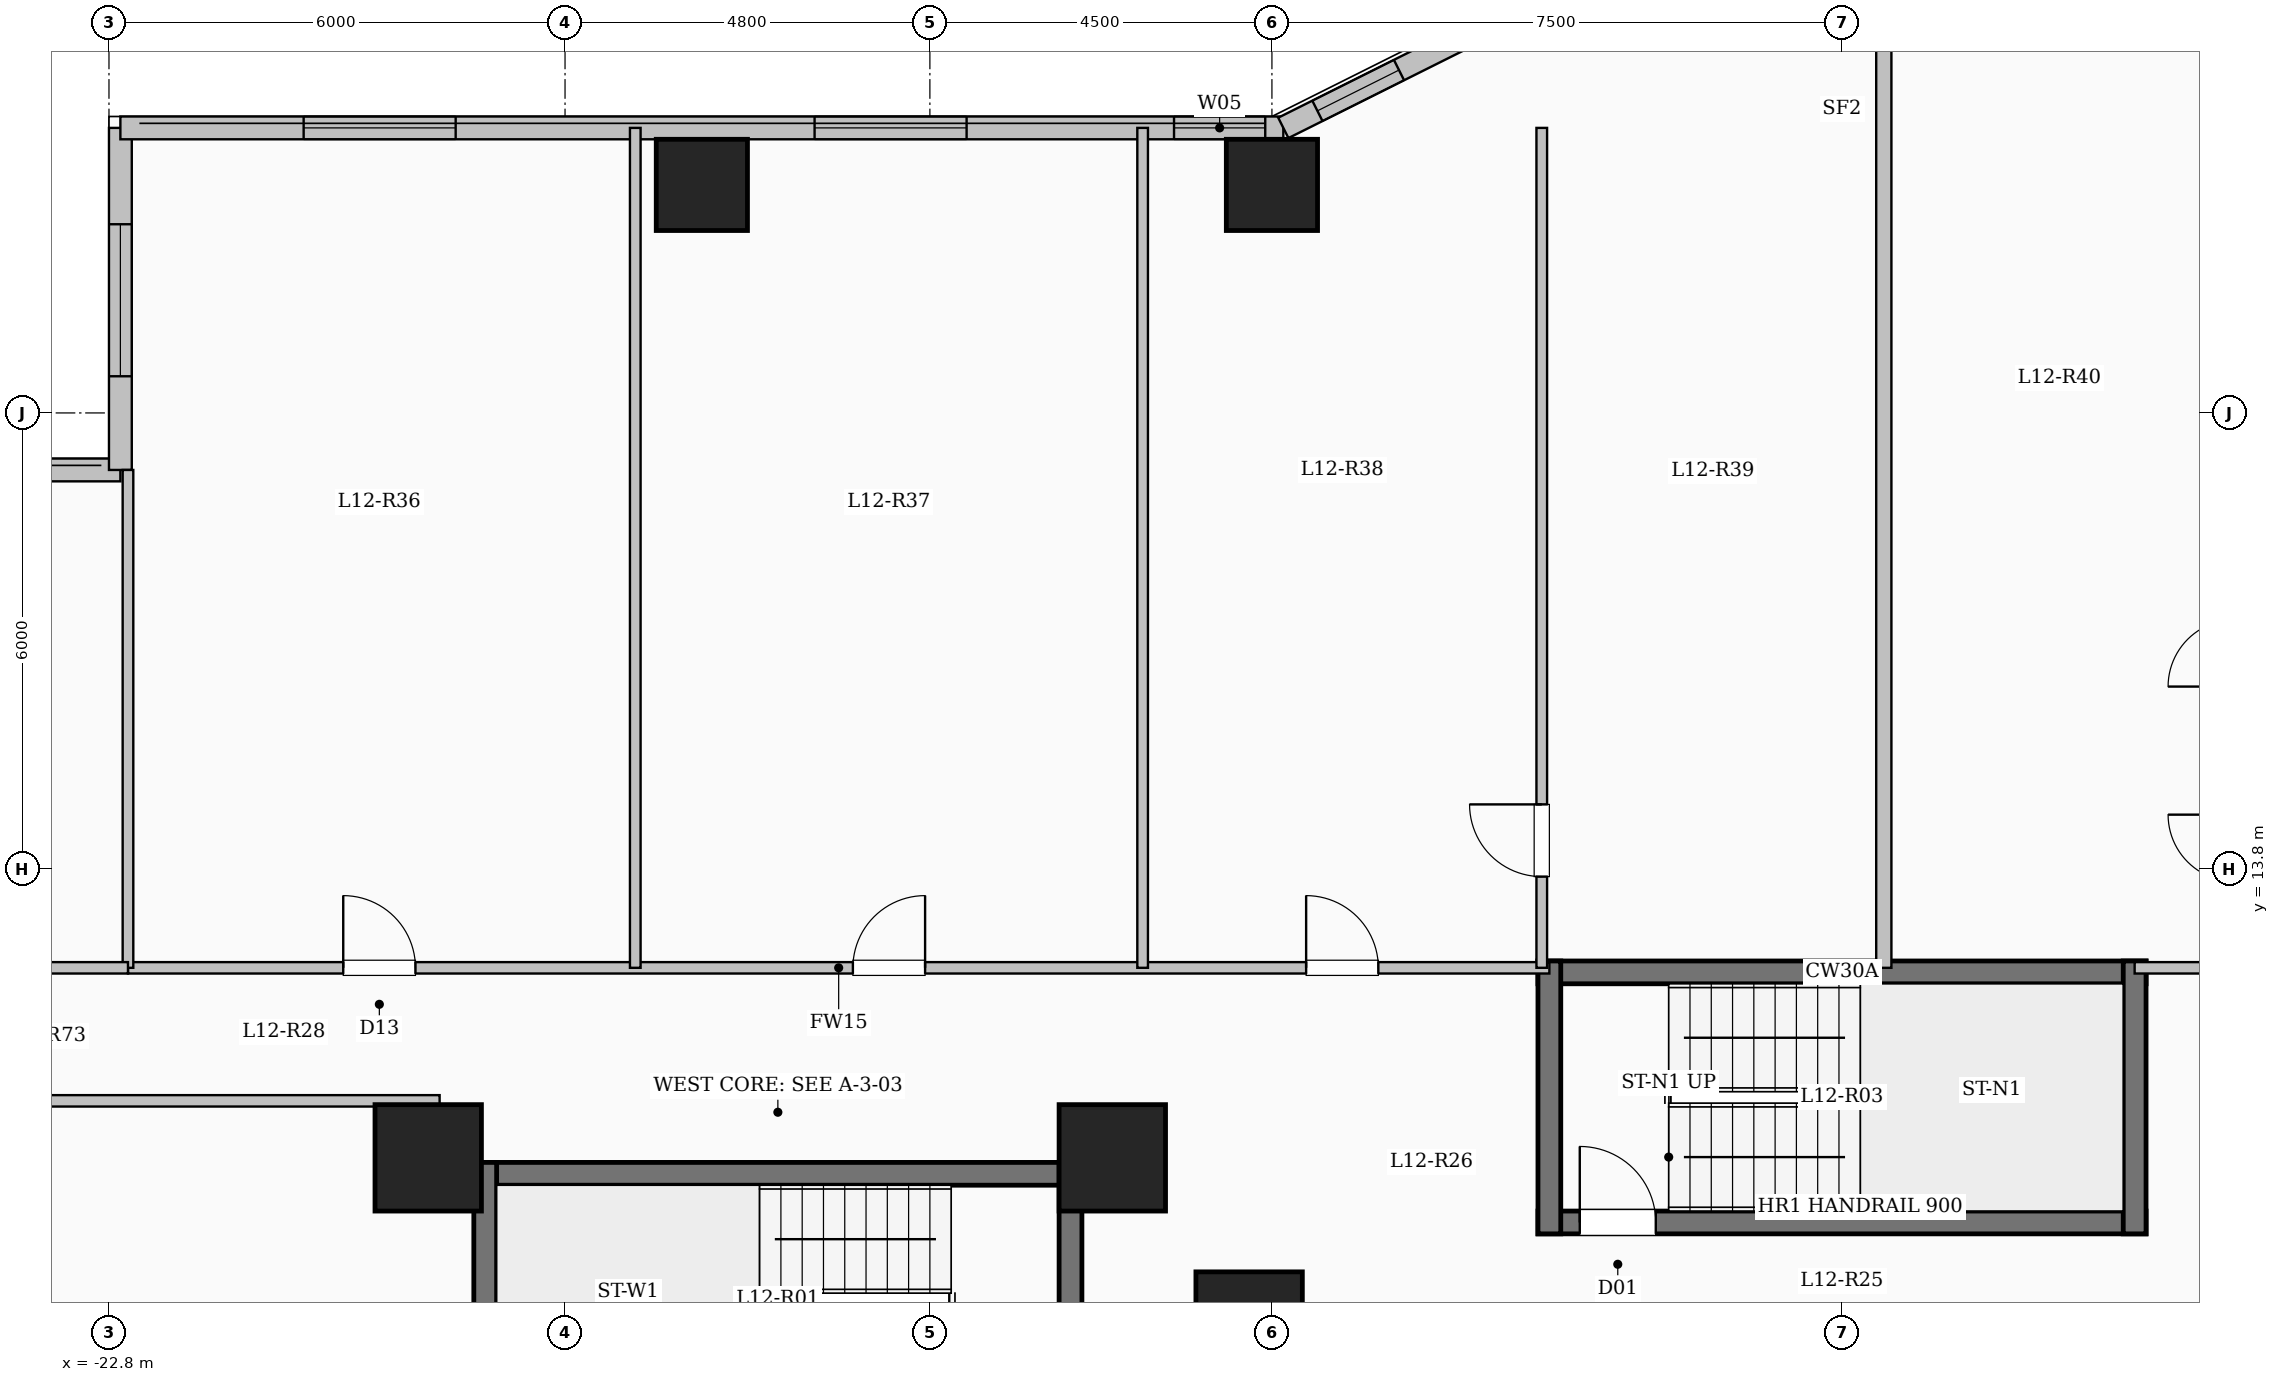
"""IFC4 building model, lengths in metres.
Left out: names, types, materials, properties, quantities, classifications, styles, units other than length and angle.
Written with IfcOpenShell. Run it as: python <this file> out.ifc"""

import sys

from ifc_helpers import new_model, si_unit, direction, frame, frame_2d, origin, origin_2d, place, context, subcontext, project, spatial, rectangle, extrude, element, fill, save


model = new_model("IFC4")
c1 = context("Model", 3, precision=1e-05, world=origin(), true_north=direction((0.0, 1.0)))
c2 = subcontext(c1, "Body", "Model", "MODEL_VIEW")
j1 = project(units=[si_unit("LENGTHUNIT", "METRE"), si_unit("PLANEANGLEUNIT", "RADIAN")], contexts=[c1])
p1 = place(None, origin())
s1 = spatial("IfcSite", under=j1, at=p1, CompositionType="ELEMENT")
p2 = place(p1, origin())
s2 = spatial("IfcBuilding", under=s1, at=p2, CompositionType="ELEMENT")
p3 = place(p2, frame((0.0, 0.0, 47.45)))
s3 = spatial("IfcBuildingStorey", under=s2, at=p3, CompositionType="ELEMENT", Elevation=47.45)
for number, where, z_axis, x_axis in (
    (1, (-7.8, 7.8, 0.0), (0.0, 0.0, 1.0), (1.0, 0.0, 0.0)),
    (2, (-9.6, 10.0, 0.0), (0.0, 0.0, 1.0), (1.0, 0.0, 0.0)),
    (3, (-18.6, 10.0, 0.0), (0.0, 0.0, 1.0), (1.0, 0.0, 0.0)),
):
    element("IfcColumn", number, at=place(p3, frame(where, z_axis=z_axis, x_axis=x_axis)), inside=s3, PredefinedType="COLUMN", context=c2, shape_type="SweptSolid", body=[
        extrude(rectangle(XDim=1.4, YDim=1.4, at=origin_2d()), origin(), (0.0, 0.0, 1.0), 3.35),
    ])
for number, where, z_axis, x_axis in (
    (4, (-15.0, 22.8, 0.0), (0.0, 0.0, 1.0), (1.0, 0.0, 0.0)),
    (5, (-7.5, 22.8, 0.0), (0.0, 0.0, 1.0), (1.0, 0.0, 0.0)),
):
    element("IfcColumn", number, at=place(p3, frame(where, z_axis=z_axis, x_axis=x_axis)), inside=s3, PredefinedType="COLUMN", context=c2, shape_type="SweptSolid", body=[
        extrude(rectangle(XDim=1.2, YDim=1.2, at=origin_2d()), origin(), (0.0, 0.0, 1.0), 3.35),
    ])
p4 = place(p3, frame((-28.65, 19.05, 0.0), z_axis=(0.0, 0.0, 1.0), x_axis=(1.0, 0.0, 0.0)))
e6 = element("IfcWall", 6, at=p4, inside=s3, PredefinedType="SOLIDWALL", context=c2, shape_type="SweptSolid", body=[
    extrude(rectangle(XDim=6.0, YDim=0.3, at=frame_2d((3.0, 0.0))), origin(), (0.0, 0.0, 1.0), 3.1),
])
p5 = place(p4, frame((2.025, 0.0, 0.9)))
e7 = element("IfcOpeningElement", 7, at=p5, cuts=e6, PredefinedType="OPENING", context=c2, shape_type="SweptSolid", body=[
    extrude(rectangle(XDim=2.0, YDim=1.7, at=frame_2d((1.0, 0.85))), frame((0.0, 0.16, 0.0), z_axis=(0.0, -1.0, 0.0), x_axis=(1.0, 0.0, 0.0)), (0.0, 0.0, 1.0), 0.32),
])
p6 = place(p3, frame((-22.65, 19.05, 0.0), z_axis=(0.0, 0.0, 1.0), x_axis=(0.0, 1.0, 0.0)))
e8 = element("IfcWall", 8, at=p6, inside=s3, PredefinedType="SOLIDWALL", context=c2, shape_type="SweptSolid", body=[
    extrude(rectangle(XDim=4.5, YDim=0.3, at=frame_2d((2.25, 0.0))), origin(), (0.0, 0.0, 1.0), 3.1),
])
p7 = place(p6, frame((1.232, 0.0, 0.9)))
e9 = element("IfcOpeningElement", 9, at=p7, cuts=e8, PredefinedType="OPENING", context=c2, shape_type="SweptSolid", body=[
    extrude(rectangle(XDim=2.0, YDim=1.7, at=frame_2d((1.0, 0.85))), frame((0.0, 0.16, 0.0), z_axis=(0.0, -1.0, 0.0), x_axis=(1.0, 0.0, 0.0)), (0.0, 0.0, 1.0), 0.32),
])
p8 = place(p3, frame((-22.65, 23.55, 0.0), z_axis=(0.0, 0.0, 1.0), x_axis=(1.0, 0.0, 0.0)))
e10 = element("IfcWall", 10, at=p8, inside=s3, PredefinedType="SOLIDWALL", context=c2, shape_type="SweptSolid", body=[
    extrude(rectangle(XDim=15.3, YDim=0.3, at=frame_2d((7.65, 0.0))), origin(), (0.0, 0.0, 1.0), 3.1),
])
p9 = place(p8, frame((2.411, 0.0, 0.9)))
e11 = element("IfcOpeningElement", 11, at=p9, cuts=e10, PredefinedType="OPENING", context=c2, shape_type="SweptSolid", body=[
    extrude(rectangle(XDim=2.0, YDim=1.7, at=frame_2d((1.0, 0.85))), frame((0.0, 0.16, 0.0), z_axis=(0.0, -1.0, 0.0), x_axis=(1.0, 0.0, 0.0)), (0.0, 0.0, 1.0), 0.32),
])
p10 = place(p8, frame((9.133, 0.0, 0.9)))
e12 = element("IfcOpeningElement", 12, at=p10, cuts=e10, PredefinedType="OPENING", context=c2, shape_type="SweptSolid", body=[
    extrude(rectangle(XDim=2.0, YDim=1.7, at=frame_2d((1.0, 0.85))), frame((0.0, 0.16, 0.0), z_axis=(0.0, -1.0, 0.0), x_axis=(1.0, 0.0, 0.0)), (0.0, 0.0, 1.0), 0.32),
])
p11 = place(p8, frame((13.862, 0.0, 0.95)))
e13 = element("IfcOpeningElement", 13, at=p11, cuts=e10, PredefinedType="OPENING", context=c2, shape_type="SweptSolid", body=[
    extrude(rectangle(XDim=1.2, YDim=1.5, at=frame_2d((0.6, 0.75))), frame((0.0, 0.16, 0.0), z_axis=(0.0, -1.0, 0.0), x_axis=(1.0, 0.0, 0.0)), (0.0, 0.0, 1.0), 0.32),
])
p12 = place(p3, frame((-7.35, 23.55, 0.0), z_axis=(0.0, 0.0, 1.0), x_axis=(0.894427191, 0.4472135955, 0.0)))
e14 = element("IfcWall", 14, at=p12, inside=s3, PredefinedType="SOLIDWALL", context=c2, shape_type="SweptSolid", body=[
    extrude(rectangle(XDim=3.354, YDim=0.3, at=frame_2d((1.677, 0.0))), origin(), (0.0, 0.0, 1.0), 3.1),
])
p13 = place(p12, frame((0.501, 0.0, 0.95)))
e15 = element("IfcOpeningElement", 15, at=p13, cuts=e14, PredefinedType="OPENING", context=c2, shape_type="SweptSolid", body=[
    extrude(rectangle(XDim=1.2, YDim=1.5, at=frame_2d((0.6, 0.75))), frame((0.0, 0.16, 0.0), z_axis=(0.0, -1.0, 0.0), x_axis=(1.0, 0.0, 0.0)), (0.0, 0.0, 1.0), 0.32),
])
p14 = place(p3, frame((4.35, 25.05, 0.0), z_axis=(0.0, 0.0, 1.0), x_axis=(0.894427191, -0.4472135955, 0.0)))
e16 = element("IfcWall", 16, at=p14, inside=s3, PredefinedType="SOLIDWALL", context=c2, shape_type="SweptSolid", body=[
    extrude(rectangle(XDim=3.354, YDim=0.3, at=frame_2d((1.677, 0.0))), origin(), (0.0, 0.0, 1.0), 3.1),
])
p15 = place(p14, frame((1.778, 0.0, 0.95)))
e17 = element("IfcOpeningElement", 17, at=p15, cuts=e16, PredefinedType="OPENING", context=c2, shape_type="SweptSolid", body=[
    extrude(rectangle(XDim=1.2, YDim=1.5, at=frame_2d((0.6, 0.75))), frame((0.0, 0.16, 0.0), z_axis=(0.0, -1.0, 0.0), x_axis=(1.0, 0.0, 0.0)), (0.0, 0.0, 1.0), 0.32),
])
p16 = place(p3, frame((-18.0, 9.79, 0.0), z_axis=(0.0, 0.0, 1.0), x_axis=(1.0, 0.0, 0.0)))
e18 = element("IfcWall", 18, at=p16, inside=s3, PredefinedType="SHEAR", context=c2, shape_type="SweptSolid", body=[
    extrude(rectangle(XDim=8.0, YDim=0.3, at=frame_2d((4.0, 0.0))), origin(), (0.0, 0.0, 1.0), 3.35),
])
for number, where, z_axis, x_axis in (
    (19, (-17.85, 6.35, 0.0), (0.0, 0.0, 1.0), (0.0, 1.0, 0.0)),
    (20, (-10.15, 6.35, 0.0), (0.0, 0.0, 1.0), (0.0, 1.0, 0.0)),
):
    element("IfcWall", number, at=place(p3, frame(where, z_axis=z_axis, x_axis=x_axis)), inside=s3, PredefinedType="SHEAR", context=c2, shape_type="SweptSolid", body=[
        extrude(rectangle(XDim=3.59, YDim=0.3, at=frame_2d((1.795, 0.0))), origin(), (0.0, 0.0, 1.0), 3.35),
    ])
p17 = place(p3, frame((-4.0, 12.44, 0.0), z_axis=(0.0, 0.0, 1.0), x_axis=(1.0, 0.0, 0.0)))
e21 = element("IfcWall", 21, at=p17, inside=s3, PredefinedType="SHEAR", context=c2, shape_type="SweptSolid", body=[
    extrude(rectangle(XDim=8.0, YDim=0.3, at=frame_2d((4.0, 0.0))), origin(), (0.0, 0.0, 1.0), 3.35),
])
p18 = place(p3, frame((-4.0, 9.15, 0.0), z_axis=(0.0, 0.0, 1.0), x_axis=(1.0, 0.0, 0.0)))
e22 = element("IfcWall", 22, at=p18, inside=s3, PredefinedType="SHEAR", context=c2, shape_type="SweptSolid", body=[
    extrude(rectangle(XDim=8.0, YDim=0.3, at=frame_2d((4.0, 0.0))), origin(), (0.0, 0.0, 1.0), 3.35),
])
p19 = place(p18, frame((0.55, 0.0, 0.0)))
e23 = element("IfcOpeningElement", 23, at=p19, cuts=e22, PredefinedType="OPENING", context=c2, shape_type="SweptSolid", body=[
    extrude(rectangle(XDim=1.0, YDim=2.15, at=frame_2d((0.5, 1.075))), frame((0.0, 0.16, 0.0), z_axis=(0.0, -1.0, 0.0), x_axis=(1.0, 0.0, 0.0)), (0.0, 0.0, 1.0), 0.32),
])
for number, where, z_axis, x_axis in (
    (24, (-3.85, 9.0, 0.0), (0.0, 0.0, 1.0), (0.0, 1.0, 0.0)),
    (25, (3.85, 9.0, 0.0), (0.0, 0.0, 1.0), (0.0, 1.0, 0.0)),
):
    element("IfcWall", number, at=place(p3, frame(where, z_axis=z_axis, x_axis=x_axis)), inside=s3, PredefinedType="SHEAR", context=c2, shape_type="SweptSolid", body=[
        extrude(rectangle(XDim=3.59, YDim=0.3, at=frame_2d((1.795, 0.0))), origin(), (0.0, 0.0, 1.0), 3.35),
    ])
p20 = place(p3, frame((-22.55, 12.5, 0.0), z_axis=(0.0, 0.0, 1.0), x_axis=(1.0, 0.0, 0.0)))
e26 = element("IfcWall", 26, at=p20, inside=s3, PredefinedType="PARTITIONING", context=c2, shape_type="SweptSolid", body=[
    extrude(rectangle(XDim=18.7, YDim=0.15, at=frame_2d((9.35, 0.0))), origin(), (0.0, 0.0, 1.0), 3.1),
])
p21 = place(p20, frame((2.832, 0.0, 0.0)))
e27 = element("IfcOpeningElement", 27, at=p21, cuts=e26, PredefinedType="OPENING", context=c2, shape_type="SweptSolid", body=[
    extrude(rectangle(XDim=0.95, YDim=2.15, at=frame_2d((0.475, 1.075))), frame((0.0, 0.085, 0.0), z_axis=(0.0, -1.0, 0.0), x_axis=(1.0, 0.0, 0.0)), (0.0, 0.0, 1.0), 0.17),
])
p22 = place(p20, frame((9.537, 0.0, 0.0)))
e28 = element("IfcOpeningElement", 28, at=p22, cuts=e26, PredefinedType="OPENING", context=c2, shape_type="SweptSolid", body=[
    extrude(rectangle(XDim=0.95, YDim=2.15, at=frame_2d((0.475, 1.075))), frame((0.0, 0.085, 0.0), z_axis=(0.0, -1.0, 0.0), x_axis=(1.0, 0.0, 0.0)), (0.0, 0.0, 1.0), 0.17),
])
p23 = place(p20, frame((15.5, 0.0, 0.0)))
e29 = element("IfcOpeningElement", 29, at=p23, cuts=e26, PredefinedType="OPENING", context=c2, shape_type="SweptSolid", body=[
    extrude(rectangle(XDim=0.95, YDim=2.15, at=frame_2d((0.475, 1.075))), frame((0.0, 0.085, 0.0), z_axis=(0.0, -1.0, 0.0), x_axis=(1.0, 0.0, 0.0)), (0.0, 0.0, 1.0), 0.17),
])
p24 = place(p3, frame((3.85, 12.5, 0.0), z_axis=(0.0, 0.0, 1.0), x_axis=(1.0, 0.0, 0.0)))
e30 = element("IfcWall", 30, at=p24, inside=s3, PredefinedType="PARTITIONING", context=c2, shape_type="SweptSolid", body=[
    extrude(rectangle(XDim=18.7, YDim=0.15, at=frame_2d((9.35, 0.0))), origin(), (0.0, 0.0, 1.0), 3.1),
])
p25 = place(p24, frame((1.6, 0.0, 0.0)))
e31 = element("IfcOpeningElement", 31, at=p25, cuts=e30, PredefinedType="OPENING", context=c2, shape_type="SweptSolid", body=[
    extrude(rectangle(XDim=0.96, YDim=2.15, at=frame_2d((0.48, 1.075))), frame((0.0, 0.085, 0.0), z_axis=(0.0, -1.0, 0.0), x_axis=(1.0, 0.0, 0.0)), (0.0, 0.0, 1.0), 0.17),
])
p26 = place(p24, frame((6.64, 0.0, 0.0)))
e32 = element("IfcOpeningElement", 32, at=p26, cuts=e30, PredefinedType="OPENING", context=c2, shape_type="SweptSolid", body=[
    extrude(rectangle(XDim=0.96, YDim=2.15, at=frame_2d((0.48, 1.075))), frame((0.0, 0.085, 0.0), z_axis=(0.0, -1.0, 0.0), x_axis=(1.0, 0.0, 0.0)), (0.0, 0.0, 1.0), 0.17),
])
p27 = place(p3, frame((0.55, 12.5, 0.0), z_axis=(0.0, 0.0, 1.0), x_axis=(0.0, 1.0, 0.0)))
e33 = element("IfcWall", 33, at=p27, inside=s3, PredefinedType="SOLIDWALL", context=c2, shape_type="SweptSolid", body=[
    extrude(rectangle(XDim=12.58, YDim=0.2, at=frame_2d((6.29, 0.0))), origin(), (0.0, 0.0, 1.0), 3.1),
])
p28 = place(p3, frame((-3.95, 12.5, 0.0), z_axis=(0.0, 0.0, 1.0), x_axis=(0.0, 1.0, 0.0)))
e34 = element("IfcWall", 34, at=p28, inside=s3, PredefinedType="PARTITIONING", context=c2, shape_type="SweptSolid", body=[
    extrude(rectangle(XDim=11.05, YDim=0.14, at=frame_2d((5.525, 0.0))), origin(), (0.0, 0.0, 1.0), 3.1),
])
p29 = place(p28, frame((1.2, 0.0, 0.0)))
e35 = element("IfcOpeningElement", 35, at=p29, cuts=e34, PredefinedType="OPENING", context=c2, shape_type="SweptSolid", body=[
    extrude(rectangle(XDim=0.95, YDim=2.15, at=frame_2d((0.475, 1.075))), frame((0.0, 0.08, 0.0), z_axis=(0.0, -1.0, 0.0), x_axis=(1.0, 0.0, 0.0)), (0.0, 0.0, 1.0), 0.16),
])
for number, where, z_axis, x_axis in (
    (36, (-15.876, 12.5, 0.0), (0.0, 0.0, 1.0), (0.0, 1.0, 0.0)),
    (37, (-9.201, 12.5, 0.0), (0.0, 0.0, 1.0), (0.0, 1.0, 0.0)),
):
    element("IfcWall", number, at=place(p3, frame(where, z_axis=z_axis, x_axis=x_axis)), inside=s3, PredefinedType="PARTITIONING", context=c2, shape_type="SweptSolid", body=[
        extrude(rectangle(XDim=11.05, YDim=0.14, at=frame_2d((5.525, 0.0))), origin(), (0.0, 0.0, 1.0), 3.1),
    ])
p30 = place(p3, frame((-28.68, 10.75, 0.0), z_axis=(0.0, 0.0, 1.0), x_axis=(1.0, 0.0, 0.0)))
e38 = element("IfcWall", 38, at=p30, inside=s3, PredefinedType="PARTITIONING", context=c2, shape_type="SweptSolid", body=[
    extrude(rectangle(XDim=10.23, YDim=0.15, at=frame_2d((5.115, 0.0))), origin(), (0.0, 0.0, 1.0), 3.1),
])
p31 = place(p3, frame((-22.55, 12.5, 0.0), z_axis=(0.0, 0.0, 1.0), x_axis=(0.0, 1.0, 0.0)))
e39 = element("IfcWall", 39, at=p31, inside=s3, PredefinedType="PARTITIONING", context=c2, shape_type="SweptSolid", body=[
    extrude(rectangle(XDim=6.55, YDim=0.14, at=frame_2d((3.275, 0.0))), origin(), (0.0, 0.0, 1.0), 3.1),
])
p32 = place(p3, frame((-28.68, 12.5, 0.0), z_axis=(0.0, 0.0, 1.0), x_axis=(1.0, 0.0, 0.0)))
e40 = element("IfcWall", 40, at=p32, inside=s3, PredefinedType="PARTITIONING", context=c2, shape_type="SweptSolid", body=[
    extrude(rectangle(XDim=6.13, YDim=0.15, at=frame_2d((3.065, 0.0))), origin(), (0.0, 0.0, 1.0), 3.1),
])
p33 = place(p32, frame((2.59, 0.0, 0.0)))
e41 = element("IfcOpeningElement", 41, at=p33, cuts=e40, PredefinedType="OPENING", context=c2, shape_type="SweptSolid", body=[
    extrude(rectangle(XDim=0.95, YDim=2.15, at=frame_2d((0.475, 1.075))), frame((0.0, 0.085, 0.0), z_axis=(0.0, -1.0, 0.0), x_axis=(1.0, 0.0, 0.0)), (0.0, 0.0, 1.0), 0.17),
])
p34 = place(p7, origin())
e42 = element("IfcWindow", 42, at=p34, inside=s3, PartitioningType="SINGLE_PANEL", PredefinedType="WINDOW", context=c2, shape_type="SweptSolid", body=[
    extrude(rectangle(XDim=2.0, YDim=1.7, at=frame_2d((1.0, 0.85))), frame((0.0, 0.03, 0.0), z_axis=(0.0, -1.0, 0.0), x_axis=(1.0, 0.0, 0.0)), (0.0, 0.0, 1.0), 0.06),
])
fill(e9, e42)
p35 = place(p9, origin())
e43 = element("IfcWindow", 43, at=p35, inside=s3, PartitioningType="SINGLE_PANEL", PredefinedType="WINDOW", context=c2, shape_type="SweptSolid", body=[
    extrude(rectangle(XDim=2.0, YDim=1.7, at=frame_2d((1.0, 0.85))), frame((0.0, 0.03, 0.0), z_axis=(0.0, -1.0, 0.0), x_axis=(1.0, 0.0, 0.0)), (0.0, 0.0, 1.0), 0.06),
])
fill(e11, e43)
p36 = place(p10, origin())
e44 = element("IfcWindow", 44, at=p36, inside=s3, PartitioningType="SINGLE_PANEL", PredefinedType="WINDOW", context=c2, shape_type="SweptSolid", body=[
    extrude(rectangle(XDim=2.0, YDim=1.7, at=frame_2d((1.0, 0.85))), frame((0.0, 0.03, 0.0), z_axis=(0.0, -1.0, 0.0), x_axis=(1.0, 0.0, 0.0)), (0.0, 0.0, 1.0), 0.06),
])
fill(e12, e44)
p37 = place(p11, origin())
e45 = element("IfcWindow", 45, at=p37, inside=s3, PartitioningType="SINGLE_PANEL", PredefinedType="WINDOW", context=c2, shape_type="SweptSolid", body=[
    extrude(rectangle(XDim=1.2, YDim=1.5, at=frame_2d((0.6, 0.75))), frame((0.0, 0.03, 0.0), z_axis=(0.0, -1.0, 0.0), x_axis=(1.0, 0.0, 0.0)), (0.0, 0.0, 1.0), 0.06),
])
fill(e13, e45)
p38 = place(p13, origin())
e46 = element("IfcWindow", 46, at=p38, inside=s3, PartitioningType="SINGLE_PANEL", PredefinedType="WINDOW", context=c2, shape_type="SweptSolid", body=[
    extrude(rectangle(XDim=1.2, YDim=1.5, at=frame_2d((0.6, 0.75))), frame((0.0, 0.03, 0.0), z_axis=(0.0, -1.0, 0.0), x_axis=(1.0, 0.0, 0.0)), (0.0, 0.0, 1.0), 0.06),
])
fill(e15, e46)
p39 = place(p19, origin())
e47 = element("IfcDoor", 47, at=p39, inside=s3, OperationType="SINGLE_SWING_LEFT", PredefinedType="DOOR", context=c2, shape_type="SweptSolid", body=[
    extrude(rectangle(XDim=1.0, YDim=2.15, at=frame_2d((0.5, 1.075))), frame((0.0, 0.025, 0.0), z_axis=(0.0, -1.0, 0.0), x_axis=(1.0, 0.0, 0.0)), (0.0, 0.0, 1.0), 0.05),
])
fill(e23, e47)
p40 = place(p21, origin())
e48 = element("IfcDoor", 48, at=p40, inside=s3, OperationType="SINGLE_SWING_LEFT", PredefinedType="DOOR", context=c2, shape_type="SweptSolid", body=[
    extrude(rectangle(XDim=0.95, YDim=2.15, at=frame_2d((0.475, 1.075))), frame((0.0, 0.025, 0.0), z_axis=(0.0, -1.0, 0.0), x_axis=(1.0, 0.0, 0.0)), (0.0, 0.0, 1.0), 0.05),
])
fill(e27, e48)
p41 = place(p22, origin())
e49 = element("IfcDoor", 49, at=p41, inside=s3, OperationType="SINGLE_SWING_RIGHT", PredefinedType="DOOR", context=c2, shape_type="SweptSolid", body=[
    extrude(rectangle(XDim=0.95, YDim=2.15, at=frame_2d((0.475, 1.075))), frame((0.0, 0.025, 0.0), z_axis=(0.0, -1.0, 0.0), x_axis=(1.0, 0.0, 0.0)), (0.0, 0.0, 1.0), 0.05),
])
fill(e28, e49)
p42 = place(p23, origin())
e50 = element("IfcDoor", 50, at=p42, inside=s3, OperationType="SINGLE_SWING_LEFT", PredefinedType="DOOR", context=c2, shape_type="SweptSolid", body=[
    extrude(rectangle(XDim=0.95, YDim=2.15, at=frame_2d((0.475, 1.075))), frame((0.0, 0.025, 0.0), z_axis=(0.0, -1.0, 0.0), x_axis=(1.0, 0.0, 0.0)), (0.0, 0.0, 1.0), 0.05),
])
fill(e29, e50)
p43 = place(p29, origin())
e51 = element("IfcDoor", 51, at=p43, inside=s3, OperationType="SINGLE_SWING_RIGHT", PredefinedType="DOOR", context=c2, shape_type="SweptSolid", body=[
    extrude(rectangle(XDim=0.95, YDim=2.15, at=frame_2d((0.475, 1.075))), frame((0.0, 0.025, 0.0), z_axis=(0.0, -1.0, 0.0), x_axis=(1.0, 0.0, 0.0)), (0.0, 0.0, 1.0), 0.05),
])
fill(e35, e51)
save(model, sys.argv[1])
